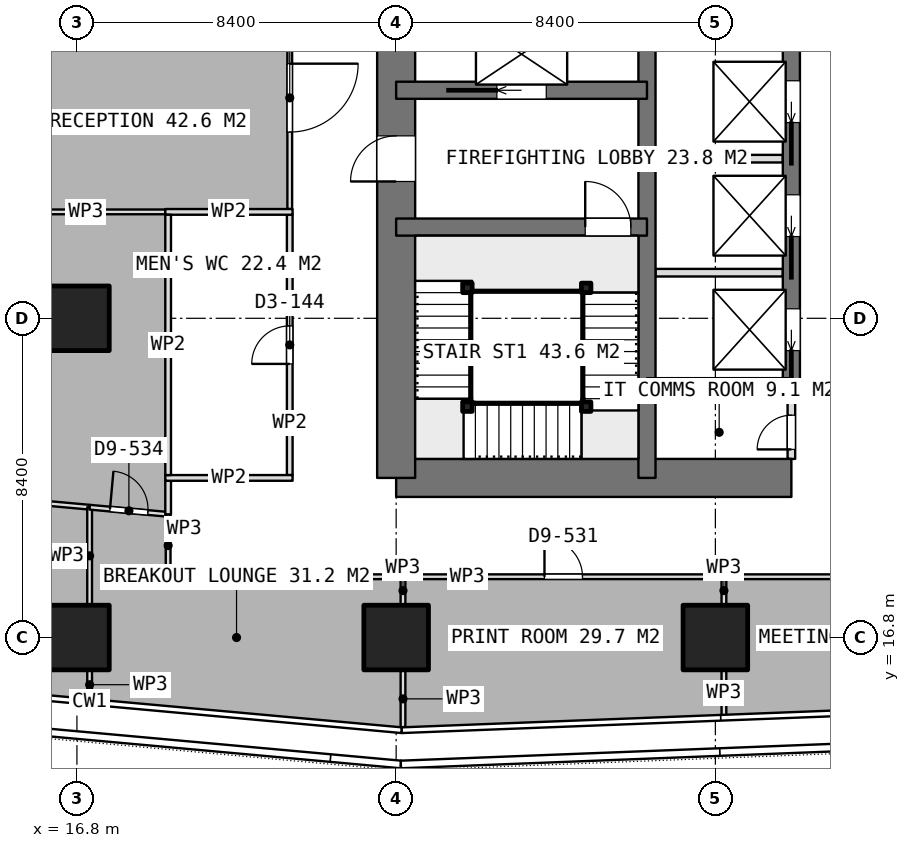
"""IFC4 building model, lengths in metres.
Left out: names, types, materials, properties, quantities, classifications, styles, units other than length and angle.
Written with IfcOpenShell. Run it as: python <this file> out.ifc"""

import sys

from ifc_helpers import new_model, si_unit, direction, frame, frame_2d, origin, origin_2d, place, context, subcontext, project, spatial, rectangle, extrude, element, fill, save


model = new_model("IFC4")
c1 = context("Model", 3, precision=1e-05, world=origin(), true_north=direction((0.0, 1.0)))
c2 = subcontext(c1, "Body", "Model", "MODEL_VIEW")
j1 = project(units=[si_unit("LENGTHUNIT", "METRE"), si_unit("PLANEANGLEUNIT", "RADIAN")], contexts=[c1])
p1 = place(None, origin())
s1 = spatial("IfcSite", under=j1, at=p1, CompositionType="ELEMENT")
p2 = place(p1, origin())
s2 = spatial("IfcBuilding", under=s1, at=p2, CompositionType="ELEMENT")
p3 = place(p2, frame((0.0, 0.0, 136.55)))
s3 = spatial("IfcBuildingStorey", under=s2, at=p3, CompositionType="ELEMENT", Elevation=136.55)
p4 = place(p3, frame((25.2, 21.0, 0.0), z_axis=(0.0, 0.0, 1.0), x_axis=(1.0, 0.0, 0.0)))
e1 = element("IfcWall", 1, at=p4, inside=s3, PredefinedType="SHEAR", context=c2, shape_type="SweptSolid", body=[
    extrude(rectangle(XDim=10.4, YDim=1.0, at=frame_2d((5.2, 0.0))), origin(), (0.0, 0.0, 1.0), 3.75),
])
p5 = place(p3, frame((25.2, 21.0, 0.0), z_axis=(0.0, 0.0, 1.0), x_axis=(0.0, 1.0, 0.0)))
e2 = element("IfcWall", 2, at=p5, inside=s3, PredefinedType="SHEAR", context=c2, shape_type="SweptSolid", body=[
    extrude(rectangle(XDim=25.2, YDim=1.0, at=frame_2d((12.6, 0.0))), origin(), (0.0, 0.0, 1.0), 3.75),
])
p6 = place(p5, frame((7.8, 0.0, 0.0)))
e3 = element("IfcOpeningElement", 3, at=p6, cuts=e2, PredefinedType="OPENING", context=c2, shape_type="SweptSolid", body=[
    extrude(rectangle(XDim=1.2, YDim=2.1, at=frame_2d((0.6, 1.05))), frame((0.0, 0.51, 0.0), z_axis=(0.0, -1.0, 0.0), x_axis=(1.0, 0.0, 0.0)), (0.0, 0.0, 1.0), 1.02),
])
p7 = place(p5, frame((14.25, 0.0, 0.0)))
e4 = element("IfcOpeningElement", 4, at=p7, cuts=e2, PredefinedType="OPENING", context=c2, shape_type="SweptSolid", body=[
    extrude(rectangle(XDim=0.9, YDim=2.1, at=frame_2d((0.45, 1.05))), frame((0.0, 0.51, 0.0), z_axis=(0.0, -1.0, 0.0), x_axis=(1.0, 0.0, 0.0)), (0.0, 0.0, 1.0), 1.02),
])
p8 = place(p5, frame((16.85, 0.0, 0.0)))
e5 = element("IfcOpeningElement", 5, at=p8, cuts=e2, PredefinedType="OPENING", context=c2, shape_type="SweptSolid", body=[
    extrude(rectangle(XDim=0.9, YDim=2.1, at=frame_2d((0.45, 1.05))), frame((0.0, 0.51, 0.0), z_axis=(0.0, -1.0, 0.0), x_axis=(1.0, 0.0, 0.0)), (0.0, 0.0, 1.0), 1.02),
])
p9 = place(p5, frame((19.025, 0.0, 0.0)))
e6 = element("IfcOpeningElement", 6, at=p9, cuts=e2, PredefinedType="OPENING", context=c2, shape_type="SweptSolid", body=[
    extrude(rectangle(XDim=1.2, YDim=2.1, at=frame_2d((0.6, 1.05))), frame((0.0, 0.51, 0.0), z_axis=(0.0, -1.0, 0.0), x_axis=(1.0, 0.0, 0.0)), (0.0, 0.0, 1.0), 1.02),
])
p10 = place(p3, frame((31.8, 21.0, 0.0), z_axis=(0.0, 0.0, 1.0), x_axis=(0.0, 1.0, 0.0)))
e7 = element("IfcWall", 7, at=p10, inside=s3, PredefinedType="SHEAR", context=c2, shape_type="SweptSolid", body=[
    extrude(rectangle(XDim=25.2, YDim=0.45, at=frame_2d((12.6, 0.0))), origin(), (0.0, 0.0, 1.0), 3.75),
])
p11 = place(p3, frame((35.6, 23.4, 0.0), z_axis=(0.0, 0.0, 1.0), x_axis=(0.0, 1.0, 0.0)))
e8 = element("IfcWall", 8, at=p11, inside=s3, PredefinedType="SHEAR", context=c2, shape_type="SweptSolid", body=[
    extrude(rectangle(XDim=18.0, YDim=0.45, at=frame_2d((9.0, 0.0))), origin(), (0.0, 0.0, 1.0), 3.75),
])
p12 = place(p11, frame((0.95, 0.0, 0.0)))
e9 = element("IfcOpeningElement", 9, at=p12, cuts=e8, PredefinedType="OPENING", context=c2, shape_type="SweptSolid", body=[
    extrude(rectangle(XDim=1.1, YDim=2.1, at=frame_2d((0.55, 1.05))), frame((0.0, 0.235, 0.0), z_axis=(0.0, -1.0, 0.0), x_axis=(1.0, 0.0, 0.0)), (0.0, 0.0, 1.0), 0.47),
])
p13 = place(p11, frame((3.95, 0.0, 0.0)))
e10 = element("IfcOpeningElement", 10, at=p13, cuts=e8, PredefinedType="OPENING", context=c2, shape_type="SweptSolid", body=[
    extrude(rectangle(XDim=1.1, YDim=2.1, at=frame_2d((0.55, 1.05))), frame((0.0, 0.235, 0.0), z_axis=(0.0, -1.0, 0.0), x_axis=(1.0, 0.0, 0.0)), (0.0, 0.0, 1.0), 0.47),
])
p14 = place(p11, frame((6.95, 0.0, 0.0)))
e11 = element("IfcOpeningElement", 11, at=p14, cuts=e8, PredefinedType="OPENING", context=c2, shape_type="SweptSolid", body=[
    extrude(rectangle(XDim=1.1, YDim=2.1, at=frame_2d((0.55, 1.05))), frame((0.0, 0.235, 0.0), z_axis=(0.0, -1.0, 0.0), x_axis=(1.0, 0.0, 0.0)), (0.0, 0.0, 1.0), 0.47),
])
p15 = place(p11, frame((9.95, 0.0, 0.0)))
e12 = element("IfcOpeningElement", 12, at=p15, cuts=e8, PredefinedType="OPENING", context=c2, shape_type="SweptSolid", body=[
    extrude(rectangle(XDim=1.1, YDim=2.1, at=frame_2d((0.55, 1.05))), frame((0.0, 0.235, 0.0), z_axis=(0.0, -1.0, 0.0), x_axis=(1.0, 0.0, 0.0)), (0.0, 0.0, 1.0), 0.47),
])
p16 = place(p11, frame((12.95, 0.0, 0.0)))
e13 = element("IfcOpeningElement", 13, at=p16, cuts=e8, PredefinedType="OPENING", context=c2, shape_type="SweptSolid", body=[
    extrude(rectangle(XDim=1.1, YDim=2.1, at=frame_2d((0.55, 1.05))), frame((0.0, 0.235, 0.0), z_axis=(0.0, -1.0, 0.0), x_axis=(1.0, 0.0, 0.0)), (0.0, 0.0, 1.0), 0.47),
])
p17 = place(p11, frame((15.95, 0.0, 0.0)))
e14 = element("IfcOpeningElement", 14, at=p17, cuts=e8, PredefinedType="OPENING", context=c2, shape_type="SweptSolid", body=[
    extrude(rectangle(XDim=1.1, YDim=2.1, at=frame_2d((0.55, 1.05))), frame((0.0, 0.235, 0.0), z_axis=(0.0, -1.0, 0.0), x_axis=(1.0, 0.0, 0.0)), (0.0, 0.0, 1.0), 0.47),
])
p18 = place(p3, frame((31.8, 23.4, 0.0), z_axis=(0.0, 0.0, 1.0), x_axis=(1.0, 0.0, 0.0)))
e15 = element("IfcWall", 15, at=p18, inside=s3, PredefinedType="SHEAR", context=c2, shape_type="SweptSolid", body=[
    extrude(rectangle(XDim=3.8, YDim=0.45, at=frame_2d((1.9, 0.0))), origin(), (0.0, 0.0, 1.0), 3.75),
])
p19 = place(p3, frame((25.2, 27.6, 0.0), z_axis=(0.0, 0.0, 1.0), x_axis=(1.0, 0.0, 0.0)))
e16 = element("IfcWall", 16, at=p19, inside=s3, PredefinedType="SHEAR", context=c2, shape_type="SweptSolid", body=[
    extrude(rectangle(XDim=6.6, YDim=0.45, at=frame_2d((3.3, 0.0))), origin(), (0.0, 0.0, 1.0), 3.75),
])
p20 = place(p19, frame((4.975, 0.0, 0.0)))
e17 = element("IfcOpeningElement", 17, at=p20, cuts=e16, PredefinedType="OPENING", context=c2, shape_type="SweptSolid", body=[
    extrude(rectangle(XDim=1.2, YDim=2.1, at=frame_2d((0.6, 1.05))), frame((0.0, 0.235, 0.0), z_axis=(0.0, -1.0, 0.0), x_axis=(1.0, 0.0, 0.0)), (0.0, 0.0, 1.0), 0.47),
])
p21 = place(p3, frame((25.2, 31.2, 0.0), z_axis=(0.0, 0.0, 1.0), x_axis=(1.0, 0.0, 0.0)))
e18 = element("IfcWall", 18, at=p21, inside=s3, PredefinedType="SHEAR", context=c2, shape_type="SweptSolid", body=[
    extrude(rectangle(XDim=6.6, YDim=0.45, at=frame_2d((3.3, 0.0))), origin(), (0.0, 0.0, 1.0), 3.75),
])
p22 = place(p21, frame((2.65, 0.0, 0.0)))
e19 = element("IfcOpeningElement", 19, at=p22, cuts=e18, PredefinedType="OPENING", context=c2, shape_type="SweptSolid", body=[
    extrude(rectangle(XDim=1.3, YDim=2.1, at=frame_2d((0.65, 1.05))), frame((0.0, 0.235, 0.0), z_axis=(0.0, -1.0, 0.0), x_axis=(1.0, 0.0, 0.0)), (0.0, 0.0, 1.0), 0.47),
])
for number, where, z_axis, x_axis in (
    (20, (16.8, 16.8, 0.0), (0.0, 0.0, 1.0), (1.0, 0.0, 0.0)),
    (21, (16.8, 25.2, 0.0), (0.0, 0.0, 1.0), (1.0, 0.0, 0.0)),
    (22, (25.2, 16.8, 0.0), (0.0, 0.0, 1.0), (1.0, 0.0, 0.0)),
    (23, (33.6, 16.8, 0.0), (0.0, 0.0, 1.0), (1.0, 0.0, 0.0)),
):
    element("IfcColumn", number, at=place(p3, frame(where, z_axis=z_axis, x_axis=x_axis)), inside=s3, PredefinedType="COLUMN", context=c2, shape_type="SweptSolid", body=[
        extrude(rectangle(XDim=1.7, YDim=1.7, at=origin_2d()), origin(), (0.0, 0.0, 1.0), 3.75),
    ])
for number, where, z_axis, x_axis in (
    (24, (32.025, 26.4, 0.0), (0.0, 0.0, 1.0), (1.0, 0.0, 0.0)),
    (25, (32.025, 29.4, 0.0), (0.0, 0.0, 1.0), (1.0, 0.0, 0.0)),
):
    element("IfcWall", number, at=place(p3, frame(where, z_axis=z_axis, x_axis=x_axis)), inside=s3, PredefinedType="PARTITIONING", context=c2, shape_type="SweptSolid", body=[
        extrude(rectangle(XDim=3.35, YDim=0.2, at=frame_2d((1.675, 0.0))), origin(), (0.0, 0.0, 1.0), 3.5),
    ])
p23 = place(p3, frame((35.6, 21.5, 0.0), z_axis=(0.0, 0.0, 1.0), x_axis=(0.0, 1.0, 0.0)))
e26 = element("IfcWall", 26, at=p23, inside=s3, PredefinedType="PARTITIONING", context=c2, shape_type="SweptSolid", body=[
    extrude(rectangle(XDim=1.675, YDim=0.2, at=frame_2d((0.837, 0.0))), origin(), (0.0, 0.0, 1.0), 3.5),
])
p24 = place(p23, frame((0.25, 0.0, 0.0)))
e27 = element("IfcOpeningElement", 27, at=p24, cuts=e26, PredefinedType="OPENING", context=c2, shape_type="SweptSolid", body=[
    extrude(rectangle(XDim=0.9, YDim=2.1, at=frame_2d((0.45, 1.05))), frame((0.0, 0.11, 0.0), z_axis=(0.0, -1.0, 0.0), x_axis=(1.0, 0.0, 0.0)), (0.0, 0.0, 1.0), 0.22),
])
for number, where, z_axis, x_axis in (
    (28, (19.125, 21.0, 0.0), (0.0, 0.0, 1.0), (1.0, 0.0, 0.0)),
    (29, (19.125, 28.0, 0.0), (0.0, 0.0, 1.0), (1.0, 0.0, 0.0)),
):
    element("IfcWall", number, at=place(p3, frame(where, z_axis=z_axis, x_axis=x_axis)), inside=s3, PredefinedType="PARTITIONING", context=c2, shape_type="SweptSolid", body=[
        extrude(rectangle(XDim=3.35, YDim=0.15, at=frame_2d((1.675, 0.0))), origin(), (0.0, 0.0, 1.0), 3.5),
    ])
p25 = place(p3, frame((19.2, 21.075, 0.0), z_axis=(0.0, 0.0, 1.0), x_axis=(0.0, 1.0, 0.0)))
e30 = element("IfcWall", 30, at=p25, inside=s3, PredefinedType="PARTITIONING", context=c2, shape_type="SweptSolid", body=[
    extrude(rectangle(XDim=6.85, YDim=0.15, at=frame_2d((3.425, 0.0))), origin(), (0.0, 0.0, 1.0), 3.5),
])
p26 = place(p3, frame((22.4, 21.075, 0.0), z_axis=(0.0, 0.0, 1.0), x_axis=(0.0, 1.0, 0.0)))
e31 = element("IfcWall", 31, at=p26, inside=s3, PredefinedType="PARTITIONING", context=c2, shape_type="SweptSolid", body=[
    extrude(rectangle(XDim=6.85, YDim=0.15, at=frame_2d((3.425, 0.0))), origin(), (0.0, 0.0, 1.0), 3.5),
])
p27 = place(p26, frame((2.925, 0.0, 0.0)))
e32 = element("IfcOpeningElement", 32, at=p27, cuts=e31, PredefinedType="OPENING", context=c2, shape_type="SweptSolid", body=[
    extrude(rectangle(XDim=1.0, YDim=2.1, at=frame_2d((0.5, 1.05))), frame((0.0, 0.085, 0.0), z_axis=(0.0, -1.0, 0.0), x_axis=(1.0, 0.0, 0.0)), (0.0, 0.0, 1.0), 0.17),
])
p28 = place(p3, frame((25.38, 18.4, 0.0), z_axis=(0.0, 0.0, 1.0), x_axis=(1.0, 0.0, 0.0)))
e33 = element("IfcWall", 33, at=p28, inside=s3, PredefinedType="PARTITIONING", context=c2, shape_type="SweptSolid", body=[
    extrude(rectangle(XDim=8.445, YDim=0.125, at=frame_2d((4.223, 0.0))), origin(), (0.0, 0.0, 1.0), 3.5),
])
p29 = place(p28, frame((3.723, 0.0, 0.0)))
e34 = element("IfcOpeningElement", 34, at=p29, cuts=e33, PredefinedType="OPENING", context=c2, shape_type="SweptSolid", body=[
    extrude(rectangle(XDim=1.0, YDim=2.1, at=frame_2d((0.5, 1.05))), frame((0.0, 0.073, 0.0), z_axis=(0.0, -1.0, 0.0), x_axis=(1.0, 0.0, 0.0)), (0.0, 0.0, 1.0), 0.145),
])
p30 = place(p3, frame((33.825, 18.4, 0.0), z_axis=(0.0, 0.0, 1.0), x_axis=(0.0, -1.0, 0.0)))
e35 = element("IfcWall", 35, at=p30, inside=s3, PredefinedType="PARTITIONING", context=c2, shape_type="SweptSolid", body=[
    extrude(rectangle(XDim=0.73, YDim=0.125, at=frame_2d((0.365, 0.0))), origin(), (0.0, 0.0, 1.0), 3.5),
])
p31 = place(p3, frame((33.825, 15.93, 0.0), z_axis=(0.0, 0.0, 1.0), x_axis=(0.0, -1.0, 0.0)))
e36 = element("IfcWall", 36, at=p31, inside=s3, PredefinedType="PARTITIONING", context=c2, shape_type="SweptSolid", body=[
    extrude(rectangle(XDim=1.188, YDim=0.125, at=frame_2d((0.594, 0.0))), origin(), (0.0, 0.0, 1.0), 3.5),
])
p32 = place(p3, frame((25.38, 14.443, 0.0), z_axis=(0.0, 0.0, 1.0), x_axis=(0.0, 1.0, 0.0)))
e37 = element("IfcWall", 37, at=p32, inside=s3, PredefinedType="PARTITIONING", context=c2, shape_type="SweptSolid", body=[
    extrude(rectangle(XDim=1.487, YDim=0.125, at=frame_2d((0.743, 0.0))), origin(), (0.0, 0.0, 1.0), 3.5),
])
p33 = place(p3, frame((25.38, 17.67, 0.0), z_axis=(0.0, 0.0, 1.0), x_axis=(0.0, 1.0, 0.0)))
e38 = element("IfcWall", 38, at=p33, inside=s3, PredefinedType="PARTITIONING", context=c2, shape_type="SweptSolid", body=[
    extrude(rectangle(XDim=0.73, YDim=0.125, at=frame_2d((0.365, 0.0))), origin(), (0.0, 0.0, 1.0), 3.5),
])
p34 = place(p3, frame((33.826, 18.4, 0.0), z_axis=(0.0, 0.0, 1.0), x_axis=(1.0, 0.0, 0.0)))
e39 = element("IfcWall", 39, at=p34, inside=s3, PredefinedType="PARTITIONING", context=c2, shape_type="SweptSolid", body=[
    extrude(rectangle(XDim=7.914, YDim=0.125, at=frame_2d((3.957, 0.0))), origin(), (0.0, 0.0, 1.0), 3.5),
])
p35 = place(p34, frame((3.457, 0.0, 0.0)))
e40 = element("IfcOpeningElement", 40, at=p35, cuts=e39, PredefinedType="OPENING", context=c2, shape_type="SweptSolid", body=[
    extrude(rectangle(XDim=1.0, YDim=2.1, at=frame_2d((0.5, 1.05))), frame((0.0, 0.073, 0.0), z_axis=(0.0, -1.0, 0.0), x_axis=(1.0, 0.0, 0.0)), (0.0, 0.0, 1.0), 0.145),
])
p36 = place(p3, frame((12.018, 20.694, 0.0), z_axis=(0.0, 0.0, 1.0), x_axis=(0.995893206468, -0.090535746043, 0.0)))
e41 = element("IfcWall", 41, at=p36, inside=s3, PredefinedType="PARTITIONING", context=c2, shape_type="SweptSolid", body=[
    extrude(rectangle(XDim=5.137, YDim=0.125, at=frame_2d((2.568, 0.0))), origin(), (0.0, 0.0, 1.0), 3.5),
])
p37 = place(p3, frame((17.134, 20.229, 0.0), z_axis=(0.0, 0.0, 1.0), x_axis=(0.0, -1.0, 0.0)))
e42 = element("IfcWall", 42, at=p37, inside=s3, PredefinedType="PARTITIONING", context=c2, shape_type="SweptSolid", body=[
    extrude(rectangle(XDim=2.559, YDim=0.125, at=frame_2d((1.28, 0.0))), origin(), (0.0, 0.0, 1.0), 3.5),
])
p38 = place(p3, frame((17.134, 15.93, 0.0), z_axis=(0.0, 0.0, 1.0), x_axis=(0.0, -1.0, 0.0)))
e43 = element("IfcWall", 43, at=p38, inside=s3, PredefinedType="PARTITIONING", context=c2, shape_type="SweptSolid", body=[
    extrude(rectangle(XDim=0.742, YDim=0.125, at=frame_2d((0.371, 0.0))), origin(), (0.0, 0.0, 1.0), 3.5),
])
p39 = place(p3, frame((19.2, 18.4, 0.0), z_axis=(0.0, 0.0, 1.0), x_axis=(1.0, 0.0, 0.0)))
e44 = element("IfcWall", 44, at=p39, inside=s3, PredefinedType="PARTITIONING", context=c2, shape_type="SweptSolid", body=[
    extrude(rectangle(XDim=6.179, YDim=0.125, at=frame_2d((3.089, 0.0))), origin(), (0.0, 0.0, 1.0), 3.5),
])
p40 = place(p3, frame((17.135, 20.229, 0.0), z_axis=(0.0, 0.0, 1.0), x_axis=(0.995881616909, -0.090663140816, 0.0)))
e45 = element("IfcWall", 45, at=p40, inside=s3, PredefinedType="PARTITIONING", context=c2, shape_type="SweptSolid", body=[
    extrude(rectangle(XDim=2.073, YDim=0.125, at=frame_2d((1.037, 0.0))), origin(), (0.0, 0.0, 1.0), 3.5),
])
p41 = place(p40, frame((0.537, 0.0, 0.0)))
e46 = element("IfcOpeningElement", 46, at=p41, cuts=e45, PredefinedType="OPENING", context=c2, shape_type="SweptSolid", body=[
    extrude(rectangle(XDim=1.0, YDim=2.1, at=frame_2d((0.5, 1.05))), frame((0.0, 0.073, 0.0), z_axis=(0.0, -1.0, 0.0), x_axis=(1.0, 0.0, 0.0)), (0.0, 0.0, 1.0), 0.145),
])
p42 = place(p3, frame((19.2, 20.041, 0.0), z_axis=(0.0, 0.0, 1.0), x_axis=(0.0, -1.0, 0.0)))
e47 = element("IfcWall", 47, at=p42, inside=s3, PredefinedType="PARTITIONING", context=c2, shape_type="SweptSolid", body=[
    extrude(rectangle(XDim=1.641, YDim=0.125, at=frame_2d((0.821, 0.0))), origin(), (0.0, 0.0, 1.0), 3.5),
])
p43 = place(p3, frame((22.4, 34.0, 0.0), z_axis=(0.0, 0.0, 1.0), x_axis=(0.0, -1.0, 0.0)))
e48 = element("IfcWall", 48, at=p43, inside=s3, PredefinedType="PARTITIONING", context=c2, shape_type="SweptSolid", body=[
    extrude(rectangle(XDim=5.925, YDim=0.125, at=frame_2d((2.962, 0.0))), origin(), (0.0, 0.0, 1.0), 3.5),
])
p44 = place(p43, frame((2.1, 0.0, 0.0)))
e49 = element("IfcOpeningElement", 49, at=p44, cuts=e48, PredefinedType="OPENING", context=c2, shape_type="SweptSolid", body=[
    extrude(rectangle(XDim=1.8, YDim=2.1, at=frame_2d((0.9, 1.05))), frame((0.0, 0.073, 0.0), z_axis=(0.0, -1.0, 0.0), x_axis=(1.0, 0.0, 0.0)), (0.0, 0.0, 1.0), 0.145),
])
p45 = place(p3, frame((19.125, 28.0, 0.0), z_axis=(0.0, 0.0, 1.0), x_axis=(-1.0, 0.0, 0.0)))
e50 = element("IfcWall", 50, at=p45, inside=s3, PredefinedType="PARTITIONING", context=c2, shape_type="SweptSolid", body=[
    extrude(rectangle(XDim=4.175, YDim=0.125, at=frame_2d((2.087, 0.0))), origin(), (0.0, 0.0, 1.0), 3.5),
])
p46 = place(p3, frame((19.2, 20.925, 0.0), z_axis=(0.0, 0.0, 1.0), x_axis=(0.0, -1.0, 0.0)))
e51 = element("IfcWall", 51, at=p46, inside=s3, PredefinedType="PARTITIONING", context=c2, shape_type="SweptSolid", body=[
    extrude(rectangle(XDim=0.884, YDim=0.15, at=frame_2d((0.442, 0.0))), origin(), (0.0, 0.0, 1.0), 3.5),
])
for number, where, z_axis, x_axis in (
    (52, (30.2, 26.0, 0.0), (0.0, 0.0, 1.0), (1.0, 0.0, 0.0)),
    (53, (30.2, 22.875, 0.0), (0.0, 0.0, 1.0), (1.0, 0.0, 0.0)),
    (54, (27.075, 22.875, 0.0), (0.0, 0.0, 1.0), (1.0, 0.0, 0.0)),
    (55, (27.075, 26.0, 0.0), (0.0, 0.0, 1.0), (1.0, 0.0, 0.0)),
):
    element("IfcColumn", number, at=place(p3, frame(where, z_axis=z_axis, x_axis=x_axis)), inside=s3, PredefinedType="COLUMN", context=c2, shape_type="SweptSolid", body=[
        extrude(rectangle(XDim=0.25, YDim=0.25, at=origin_2d()), origin(), (0.0, 0.0, 1.0), 3.75),
    ])
p47 = place(p6, origin())
e56 = element("IfcDoor", 56, at=p47, inside=s3, OperationType="SINGLE_SWING_LEFT", PredefinedType="DOOR", context=c2, shape_type="SweptSolid", body=[
    extrude(rectangle(XDim=1.2, YDim=2.1, at=frame_2d((0.6, 1.05))), frame((0.0, 0.025, 0.0), z_axis=(0.0, -1.0, 0.0), x_axis=(1.0, 0.0, 0.0)), (0.0, 0.0, 1.0), 0.05),
])
fill(e3, e56)
p48 = place(p24, origin())
e57 = element("IfcDoor", 57, at=p48, inside=s3, OperationType="SINGLE_SWING_LEFT", PredefinedType="DOOR", context=c2, shape_type="SweptSolid", body=[
    extrude(rectangle(XDim=0.9, YDim=2.1, at=frame_2d((0.45, 1.05))), frame((0.0, 0.025, 0.0), z_axis=(0.0, -1.0, 0.0), x_axis=(1.0, 0.0, 0.0)), (0.0, 0.0, 1.0), 0.05),
])
fill(e27, e57)
p49 = place(p12, origin())
e58 = element("IfcDoor", 58, at=p49, inside=s3, OperationType="SLIDING_TO_LEFT", PredefinedType="USERDEFINED", context=c2, shape_type="SweptSolid", body=[
    extrude(rectangle(XDim=1.1, YDim=2.1, at=frame_2d((0.55, 1.05))), frame((0.0, 0.025, 0.0), z_axis=(0.0, -1.0, 0.0), x_axis=(1.0, 0.0, 0.0)), (0.0, 0.0, 1.0), 0.05),
])
fill(e9, e58)
p50 = place(p13, origin())
e59 = element("IfcDoor", 59, at=p50, inside=s3, OperationType="SLIDING_TO_LEFT", PredefinedType="USERDEFINED", context=c2, shape_type="SweptSolid", body=[
    extrude(rectangle(XDim=1.1, YDim=2.1, at=frame_2d((0.55, 1.05))), frame((0.0, 0.025, 0.0), z_axis=(0.0, -1.0, 0.0), x_axis=(1.0, 0.0, 0.0)), (0.0, 0.0, 1.0), 0.05),
])
fill(e10, e59)
p51 = place(p14, origin())
e60 = element("IfcDoor", 60, at=p51, inside=s3, OperationType="SLIDING_TO_LEFT", PredefinedType="USERDEFINED", context=c2, shape_type="SweptSolid", body=[
    extrude(rectangle(XDim=1.1, YDim=2.1, at=frame_2d((0.55, 1.05))), frame((0.0, 0.025, 0.0), z_axis=(0.0, -1.0, 0.0), x_axis=(1.0, 0.0, 0.0)), (0.0, 0.0, 1.0), 0.05),
])
fill(e11, e60)
p52 = place(p22, origin())
e61 = element("IfcDoor", 61, at=p52, inside=s3, OperationType="SLIDING_TO_LEFT", PredefinedType="USERDEFINED", context=c2, shape_type="SweptSolid", body=[
    extrude(rectangle(XDim=1.3, YDim=2.1, at=frame_2d((0.65, 1.05))), frame((0.0, 0.025, 0.0), z_axis=(0.0, -1.0, 0.0), x_axis=(1.0, 0.0, 0.0)), (0.0, 0.0, 1.0), 0.05),
])
fill(e19, e61)
p53 = place(p27, origin())
e62 = element("IfcDoor", 62, at=p53, inside=s3, OperationType="SINGLE_SWING_LEFT", PredefinedType="DOOR", context=c2, shape_type="SweptSolid", body=[
    extrude(rectangle(XDim=1.0, YDim=2.1, at=frame_2d((0.5, 1.05))), frame((0.0, 0.025, 0.0), z_axis=(0.0, -1.0, 0.0), x_axis=(1.0, 0.0, 0.0)), (0.0, 0.0, 1.0), 0.05),
])
fill(e32, e62)
p54 = place(p29, origin())
e63 = element("IfcDoor", 63, at=p54, inside=s3, OperationType="SINGLE_SWING_LEFT", PredefinedType="DOOR", context=c2, shape_type="SweptSolid", body=[
    extrude(rectangle(XDim=1.0, YDim=2.1, at=frame_2d((0.5, 1.05))), frame((0.0, 0.025, 0.0), z_axis=(0.0, -1.0, 0.0), x_axis=(1.0, 0.0, 0.0)), (0.0, 0.0, 1.0), 0.05),
])
fill(e34, e63)
p55 = place(p41, origin())
e64 = element("IfcDoor", 64, at=p55, inside=s3, OperationType="SINGLE_SWING_LEFT", PredefinedType="DOOR", context=c2, shape_type="SweptSolid", body=[
    extrude(rectangle(XDim=1.0, YDim=2.1, at=frame_2d((0.5, 1.05))), frame((0.0, 0.025, 0.0), z_axis=(0.0, -1.0, 0.0), x_axis=(1.0, 0.0, 0.0)), (0.0, 0.0, 1.0), 0.05),
])
fill(e46, e64)
p56 = place(p44, origin())
e65 = element("IfcDoor", 65, at=p56, inside=s3, OperationType="DOUBLE_DOOR_SINGLE_SWING", PredefinedType="DOOR", context=c2, shape_type="SweptSolid", body=[
    extrude(rectangle(XDim=1.8, YDim=2.1, at=frame_2d((0.9, 1.05))), frame((0.0, 0.025, 0.0), z_axis=(0.0, -1.0, 0.0), x_axis=(1.0, 0.0, 0.0)), (0.0, 0.0, 1.0), 0.05),
])
fill(e49, e65)
p57 = place(p20, origin())
e66 = element("IfcDoor", 66, at=p57, inside=s3, OperationType="SINGLE_SWING_RIGHT", PredefinedType="DOOR", context=c2, shape_type="SweptSolid", body=[
    extrude(rectangle(XDim=1.2, YDim=2.1, at=frame_2d((0.6, 1.05))), frame((0.0, 0.025, 0.0), z_axis=(0.0, -1.0, 0.0), x_axis=(1.0, 0.0, 0.0)), (0.0, 0.0, 1.0), 0.05),
])
fill(e17, e66)
save(model, sys.argv[1])
